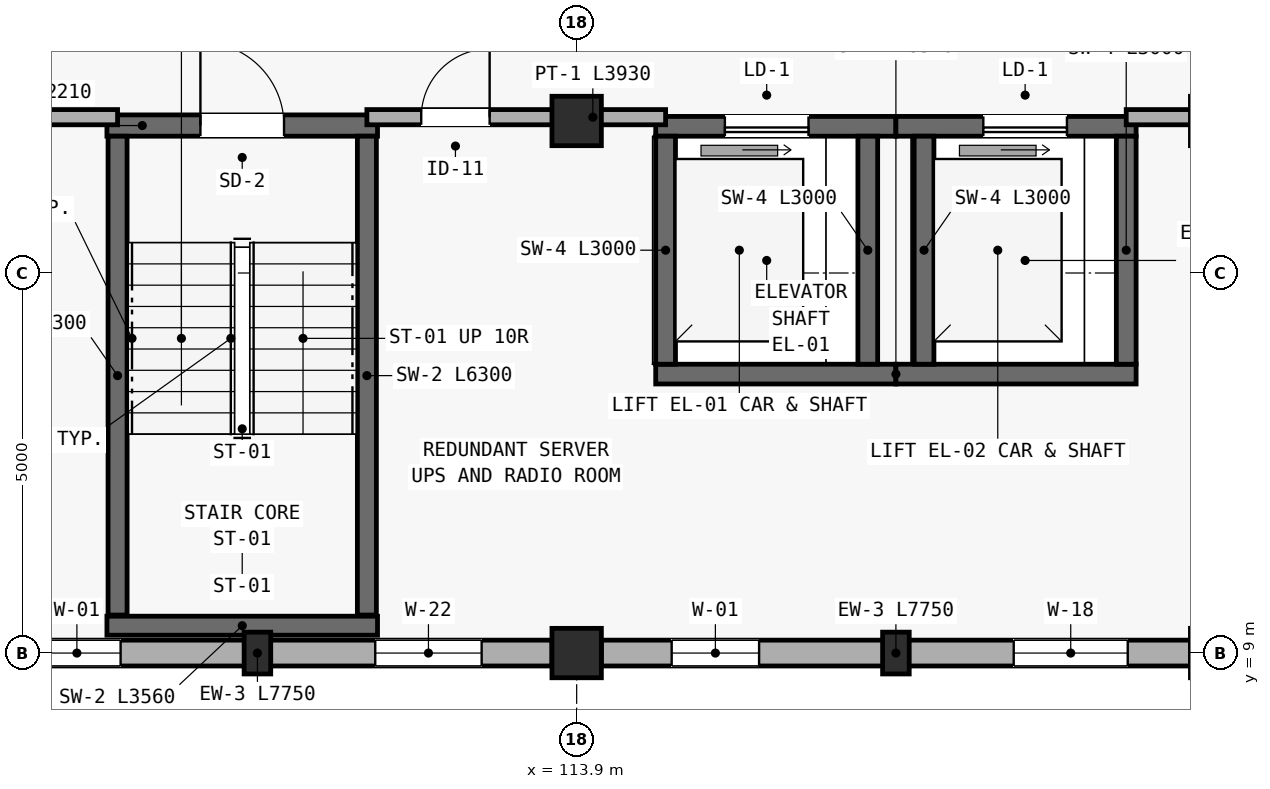
"""IFC4 building model, lengths in metres.
Left out: names, types, materials, properties, quantities, classifications, styles, units other than length and angle.
Written with IfcOpenShell. Run it as: python <this file> out.ifc"""

import sys

from ifc_helpers import new_model, si_unit, direction, frame, frame_2d, origin, origin_2d, place, context, subcontext, project, spatial, rectangle, extrude, element, fill, save


model = new_model("IFC4")
c1 = context("Model", 3, precision=1e-05, world=origin(), true_north=direction((0.0, 1.0)))
c2 = subcontext(c1, "Body", "Model", "MODEL_VIEW")
j1 = project(units=[si_unit("LENGTHUNIT", "METRE"), si_unit("PLANEANGLEUNIT", "RADIAN")], contexts=[c1])
p1 = place(None, origin())
s1 = spatial("IfcSite", under=j1, at=p1, CompositionType="ELEMENT")
p2 = place(p1, origin())
s2 = spatial("IfcBuilding", under=s1, at=p2, CompositionType="ELEMENT")
p3 = place(p2, frame((0.0, 0.0, 9.3)))
s3 = spatial("IfcBuildingStorey", under=s2, at=p3, CompositionType="ELEMENT", Elevation=9.3)
for number, where, z_axis, x_axis in (
    (1, (113.9, 9.0, 0.0), (0.0, 0.0, 1.0), (1.0, 0.0, 0.0)),
    (2, (113.9, 16.0, 0.0), (0.0, 0.0, 1.0), (1.0, 0.0, 0.0)),
    (3, (122.3, 9.0, 0.0), (0.0, 0.0, 1.0), (1.0, 0.0, 0.0)),
    (4, (122.3, 16.0, 0.0), (0.0, 0.0, 1.0), (1.0, 0.0, 0.0)),
):
    element("IfcColumn", number, at=place(p3, frame(where, z_axis=z_axis, x_axis=x_axis)), inside=s3, PredefinedType="COLUMN", context=c2, shape_type="SweptSolid", body=[
        extrude(rectangle(XDim=0.65, YDim=0.65, at=origin_2d()), origin(), (0.0, 0.0, 1.0), 3.45),
    ])
for number, where, z_axis, x_axis in (
    (5, (109.7, 9.0, 0.0), (0.0, 0.0, 1.0), (1.0, 0.0, 0.0)),
    (6, (118.1, 9.0, 0.0), (0.0, 0.0, 1.0), (1.0, 0.0, 0.0)),
):
    element("IfcColumn", number, at=place(p3, frame(where, z_axis=z_axis, x_axis=x_axis)), inside=s3, PredefinedType="PILASTER", context=c2, shape_type="SweptSolid", body=[
        extrude(rectangle(XDim=0.35, YDim=0.55, at=origin_2d()), origin(), (0.0, 0.0, 1.0), 3.45),
    ])
p4 = place(p3, frame((105.825, 9.0, 0.0), z_axis=(0.0, 0.0, 1.0), x_axis=(1.0, 0.0, 0.0)))
e7 = element("IfcWall", 7, at=p4, inside=s3, PredefinedType="STANDARD", context=c2, shape_type="SweptSolid", body=[
    extrude(rectangle(XDim=7.75, YDim=0.34, at=frame_2d((3.875, 0.0))), origin(), (0.0, 0.0, 1.0), 2.69),
])
p5 = place(p4, frame((0.925, 0.0, 0.75)))
e8 = element("IfcOpeningElement", 8, at=p5, cuts=e7, PredefinedType="OPENING", context=c2, shape_type="SweptSolid", body=[
    extrude(rectangle(XDim=1.15, YDim=1.45, at=frame_2d((0.575, 0.725))), frame((0.0, 0.18, 0.0), z_axis=(0.0, -1.0, 0.0), x_axis=(1.0, 0.0, 0.0)), (0.0, 0.0, 1.0), 0.36),
])
p6 = place(p4, frame((5.425, 0.0, 0.75)))
e9 = element("IfcOpeningElement", 9, at=p6, cuts=e7, PredefinedType="OPENING", context=c2, shape_type="SweptSolid", body=[
    extrude(rectangle(XDim=1.4, YDim=1.45, at=frame_2d((0.7, 0.725))), frame((0.0, 0.18, 0.0), z_axis=(0.0, -1.0, 0.0), x_axis=(1.0, 0.0, 0.0)), (0.0, 0.0, 1.0), 0.36),
])
p7 = place(p3, frame((114.225, 9.0, 0.0), z_axis=(0.0, 0.0, 1.0), x_axis=(1.0, 0.0, 0.0)))
e10 = element("IfcWall", 10, at=p7, inside=s3, PredefinedType="STANDARD", context=c2, shape_type="SweptSolid", body=[
    extrude(rectangle(XDim=7.75, YDim=0.34, at=frame_2d((3.875, 0.0))), origin(), (0.0, 0.0, 1.0), 2.69),
])
p8 = place(p7, frame((0.925, 0.0, 0.75)))
e11 = element("IfcOpeningElement", 11, at=p8, cuts=e10, PredefinedType="OPENING", context=c2, shape_type="SweptSolid", body=[
    extrude(rectangle(XDim=1.15, YDim=1.45, at=frame_2d((0.575, 0.725))), frame((0.0, 0.18, 0.0), z_axis=(0.0, -1.0, 0.0), x_axis=(1.0, 0.0, 0.0)), (0.0, 0.0, 1.0), 0.36),
])
p9 = place(p7, frame((5.425, 0.0, 0.75)))
e12 = element("IfcOpeningElement", 12, at=p9, cuts=e10, PredefinedType="OPENING", context=c2, shape_type="SweptSolid", body=[
    extrude(rectangle(XDim=1.5, YDim=1.4, at=frame_2d((0.75, 0.7))), frame((0.0, 0.18, 0.0), z_axis=(0.0, -1.0, 0.0), x_axis=(1.0, 0.0, 0.0)), (0.0, 0.0, 1.0), 0.36),
])
p10 = place(p3, frame((107.72, 15.94, 0.0), z_axis=(0.0, 0.0, 1.0), x_axis=(1.0, 0.0, 0.0)))
e13 = element("IfcWall", 13, at=p10, inside=s3, PredefinedType="SHEAR", context=c2, shape_type="SweptSolid", body=[
    extrude(rectangle(XDim=3.56, YDim=0.28, at=frame_2d((1.78, 0.0))), origin(), (0.0, 0.0, 1.0), 3.2),
])
p11 = place(p10, frame((1.23, 0.0, 0.0)))
e14 = element("IfcOpeningElement", 14, at=p11, cuts=e13, PredefinedType="OPENING", context=c2, shape_type="SweptSolid", body=[
    extrude(rectangle(XDim=1.1, YDim=2.15, at=frame_2d((0.55, 1.075))), frame((0.0, 0.15, 0.0), z_axis=(0.0, -1.0, 0.0), x_axis=(1.0, 0.0, 0.0)), (0.0, 0.0, 1.0), 0.3),
])
p12 = place(p3, frame((111.28, 9.36, 0.0), z_axis=(0.0, 0.0, 1.0), x_axis=(-1.0, 0.0, 0.0)))
e15 = element("IfcWall", 15, at=p12, inside=s3, PredefinedType="SHEAR", context=c2, shape_type="SweptSolid", body=[
    extrude(rectangle(XDim=3.56, YDim=0.25, at=frame_2d((1.78, 0.0))), origin(), (0.0, 0.0, 1.0), 3.2),
])
for number, where, z_axis, x_axis in (
    (16, (107.86, 15.8, 0.0), (0.0, 0.0, 1.0), (0.0, -1.0, 0.0)),
    (17, (111.14, 9.5, 0.0), (0.0, 0.0, 1.0), (0.0, 1.0, 0.0)),
):
    element("IfcWall", number, at=place(p3, frame(where, z_axis=z_axis, x_axis=x_axis)), inside=s3, PredefinedType="SHEAR", context=c2, shape_type="SweptSolid", body=[
        extrude(rectangle(XDim=6.3, YDim=0.25, at=frame_2d((3.15, 0.0))), origin(), (0.0, 0.0, 1.0), 3.2),
    ])
p13 = place(p3, frame((114.94, 12.67, 0.0), z_axis=(0.0, 0.0, 1.0), x_axis=(1.0, 0.0, 0.0)))
e18 = element("IfcWall", 18, at=p13, inside=s3, PredefinedType="SHEAR", context=c2, shape_type="SweptSolid", body=[
    extrude(rectangle(XDim=3.16, YDim=0.26, at=frame_2d((1.58, 0.0))), origin(), (0.0, 0.0, 1.0), 3.2),
])
p14 = place(p3, frame((118.1, 15.93, 0.0), z_axis=(0.0, 0.0, 1.0), x_axis=(-1.0, 0.0, 0.0)))
e19 = element("IfcWall", 19, at=p14, inside=s3, PredefinedType="SHEAR", context=c2, shape_type="SweptSolid", body=[
    extrude(rectangle(XDim=3.16, YDim=0.26, at=frame_2d((1.58, 0.0))), origin(), (0.0, 0.0, 1.0), 3.2),
])
p15 = place(p14, frame((1.15, 0.0, 0.0)))
e20 = element("IfcOpeningElement", 20, at=p15, cuts=e19, PredefinedType="OPENING", context=c2, shape_type="SweptSolid", body=[
    extrude(rectangle(XDim=1.1, YDim=2.15, at=frame_2d((0.55, 1.075))), frame((0.0, 0.14, 0.0), z_axis=(0.0, -1.0, 0.0), x_axis=(1.0, 0.0, 0.0)), (0.0, 0.0, 1.0), 0.28),
])
for number, where, z_axis, x_axis in (
    (21, (115.07, 15.8, 0.0), (0.0, 0.0, 1.0), (0.0, -1.0, 0.0)),
    (22, (117.73, 12.8, 0.0), (0.0, 0.0, 1.0), (0.0, 1.0, 0.0)),
):
    element("IfcWall", number, at=place(p3, frame(where, z_axis=z_axis, x_axis=x_axis)), inside=s3, PredefinedType="SHEAR", context=c2, shape_type="SweptSolid", body=[
        extrude(rectangle(XDim=3.0, YDim=0.26, at=frame_2d((1.5, 0.0))), origin(), (0.0, 0.0, 1.0), 3.2),
    ])
p16 = place(p3, frame((118.1, 12.67, 0.0), z_axis=(0.0, 0.0, 1.0), x_axis=(1.0, 0.0, 0.0)))
e23 = element("IfcWall", 23, at=p16, inside=s3, PredefinedType="SHEAR", context=c2, shape_type="SweptSolid", body=[
    extrude(rectangle(XDim=3.16, YDim=0.26, at=frame_2d((1.58, 0.0))), origin(), (0.0, 0.0, 1.0), 3.2),
])
p17 = place(p3, frame((121.26, 15.93, 0.0), z_axis=(0.0, 0.0, 1.0), x_axis=(-1.0, 0.0, 0.0)))
e24 = element("IfcWall", 24, at=p17, inside=s3, PredefinedType="SHEAR", context=c2, shape_type="SweptSolid", body=[
    extrude(rectangle(XDim=3.16, YDim=0.26, at=frame_2d((1.58, 0.0))), origin(), (0.0, 0.0, 1.0), 3.2),
])
p18 = place(p17, frame((0.91, 0.0, 0.0)))
e25 = element("IfcOpeningElement", 25, at=p18, cuts=e24, PredefinedType="OPENING", context=c2, shape_type="SweptSolid", body=[
    extrude(rectangle(XDim=1.1, YDim=2.15, at=frame_2d((0.55, 1.075))), frame((0.0, 0.14, 0.0), z_axis=(0.0, -1.0, 0.0), x_axis=(1.0, 0.0, 0.0)), (0.0, 0.0, 1.0), 0.28),
])
for number, where, z_axis, x_axis in (
    (26, (118.47, 15.8, 0.0), (0.0, 0.0, 1.0), (0.0, -1.0, 0.0)),
    (27, (121.13, 12.8, 0.0), (0.0, 0.0, 1.0), (0.0, 1.0, 0.0)),
):
    element("IfcWall", number, at=place(p3, frame(where, z_axis=z_axis, x_axis=x_axis)), inside=s3, PredefinedType="SHEAR", context=c2, shape_type="SweptSolid", body=[
        extrude(rectangle(XDim=3.0, YDim=0.26, at=frame_2d((1.5, 0.0))), origin(), (0.0, 0.0, 1.0), 3.2),
    ])
p19 = place(p3, frame((105.65, 16.05, 0.0), z_axis=(0.0, 0.0, 1.0), x_axis=(1.0, 0.0, 0.0)))
e28 = element("IfcWall", 28, at=p19, inside=s3, PredefinedType="PARTITIONING", context=c2, shape_type="SweptSolid", body=[
    extrude(rectangle(XDim=2.21, YDim=0.2, at=frame_2d((1.105, 0.0))), origin(), (0.0, 0.0, 1.0), 2.7),
])
p20 = place(p3, frame((111.14, 16.05, 0.0), z_axis=(0.0, 0.0, 1.0), x_axis=(1.0, 0.0, 0.0)))
e29 = element("IfcWall", 29, at=p20, inside=s3, PredefinedType="PARTITIONING", context=c2, shape_type="SweptSolid", body=[
    extrude(rectangle(XDim=3.93, YDim=0.2, at=frame_2d((1.965, 0.0))), origin(), (0.0, 0.0, 1.0), 2.7),
])
p21 = place(p20, frame((0.715, 0.0, 0.0)))
e30 = element("IfcOpeningElement", 30, at=p21, cuts=e29, PredefinedType="OPENING", context=c2, shape_type="SweptSolid", body=[
    extrude(rectangle(XDim=0.9, YDim=2.08, at=frame_2d((0.45, 1.04))), frame((0.0, 0.11, 0.0), z_axis=(0.0, -1.0, 0.0), x_axis=(1.0, 0.0, 0.0)), (0.0, 0.0, 1.0), 0.22),
])
p22 = place(p3, frame((121.13, 16.05, 0.0), z_axis=(0.0, 0.0, 1.0), x_axis=(1.0, 0.0, 0.0)))
e31 = element("IfcWall", 31, at=p22, inside=s3, PredefinedType="PARTITIONING", context=c2, shape_type="SweptSolid", body=[
    extrude(rectangle(XDim=3.73, YDim=0.2, at=frame_2d((1.865, 0.0))), origin(), (0.0, 0.0, 1.0), 2.7),
])
p23 = place(p5, origin())
e32 = element("IfcWindow", 32, at=p23, inside=s3, PartitioningType="SINGLE_PANEL", PredefinedType="WINDOW", context=c2, shape_type="SweptSolid", body=[
    extrude(rectangle(XDim=1.15, YDim=1.45, at=frame_2d((0.575, 0.725))), frame((0.0, 0.03, 0.0), z_axis=(0.0, -1.0, 0.0), x_axis=(1.0, 0.0, 0.0)), (0.0, 0.0, 1.0), 0.06),
])
fill(e8, e32)
p24 = place(p6, origin())
e33 = element("IfcWindow", 33, at=p24, inside=s3, PartitioningType="DOUBLE_PANEL_VERTICAL", PredefinedType="WINDOW", context=c2, shape_type="SweptSolid", body=[
    extrude(rectangle(XDim=1.4, YDim=1.45, at=frame_2d((0.7, 0.725))), frame((0.0, 0.03, 0.0), z_axis=(0.0, -1.0, 0.0), x_axis=(1.0, 0.0, 0.0)), (0.0, 0.0, 1.0), 0.06),
])
fill(e9, e33)
p25 = place(p8, origin())
e34 = element("IfcWindow", 34, at=p25, inside=s3, PartitioningType="SINGLE_PANEL", PredefinedType="WINDOW", context=c2, shape_type="SweptSolid", body=[
    extrude(rectangle(XDim=1.15, YDim=1.45, at=frame_2d((0.575, 0.725))), frame((0.0, 0.03, 0.0), z_axis=(0.0, -1.0, 0.0), x_axis=(1.0, 0.0, 0.0)), (0.0, 0.0, 1.0), 0.06),
])
fill(e11, e34)
p26 = place(p9, origin())
e35 = element("IfcWindow", 35, at=p26, inside=s3, PartitioningType="DOUBLE_PANEL_VERTICAL", PredefinedType="WINDOW", context=c2, shape_type="SweptSolid", body=[
    extrude(rectangle(XDim=1.5, YDim=1.4, at=frame_2d((0.75, 0.7))), frame((0.0, 0.03, 0.0), z_axis=(0.0, -1.0, 0.0), x_axis=(1.0, 0.0, 0.0)), (0.0, 0.0, 1.0), 0.06),
])
fill(e12, e35)
p27 = place(p11, origin())
e36 = element("IfcDoor", 36, at=p27, inside=s3, OperationType="SINGLE_SWING_LEFT", PredefinedType="DOOR", context=c2, shape_type="SweptSolid", body=[
    extrude(rectangle(XDim=1.1, YDim=2.15, at=frame_2d((0.55, 1.075))), frame((0.0, 0.025, 0.0), z_axis=(0.0, -1.0, 0.0), x_axis=(1.0, 0.0, 0.0)), (0.0, 0.0, 1.0), 0.05),
])
fill(e14, e36)
p28 = place(p15, origin())
e37 = element("IfcDoor", 37, at=p28, inside=s3, OperationType="SLIDING_TO_LEFT", PredefinedType="DOOR", context=c2, shape_type="SweptSolid", body=[
    extrude(rectangle(XDim=1.1, YDim=2.15, at=frame_2d((0.55, 1.075))), frame((0.0, 0.025, 0.0), z_axis=(0.0, -1.0, 0.0), x_axis=(1.0, 0.0, 0.0)), (0.0, 0.0, 1.0), 0.05),
])
fill(e20, e37)
p29 = place(p18, origin())
e38 = element("IfcDoor", 38, at=p29, inside=s3, OperationType="SLIDING_TO_LEFT", PredefinedType="DOOR", context=c2, shape_type="SweptSolid", body=[
    extrude(rectangle(XDim=1.1, YDim=2.15, at=frame_2d((0.55, 1.075))), frame((0.0, 0.025, 0.0), z_axis=(0.0, -1.0, 0.0), x_axis=(1.0, 0.0, 0.0)), (0.0, 0.0, 1.0), 0.05),
])
fill(e25, e38)
p30 = place(p21, origin())
e39 = element("IfcDoor", 39, at=p30, inside=s3, OperationType="SINGLE_SWING_RIGHT", PredefinedType="DOOR", context=c2, shape_type="SweptSolid", body=[
    extrude(rectangle(XDim=0.9, YDim=2.08, at=frame_2d((0.45, 1.04))), frame((0.0, 0.025, 0.0), z_axis=(0.0, -1.0, 0.0), x_axis=(1.0, 0.0, 0.0)), (0.0, 0.0, 1.0), 0.05),
])
fill(e30, e39)
save(model, sys.argv[1])
